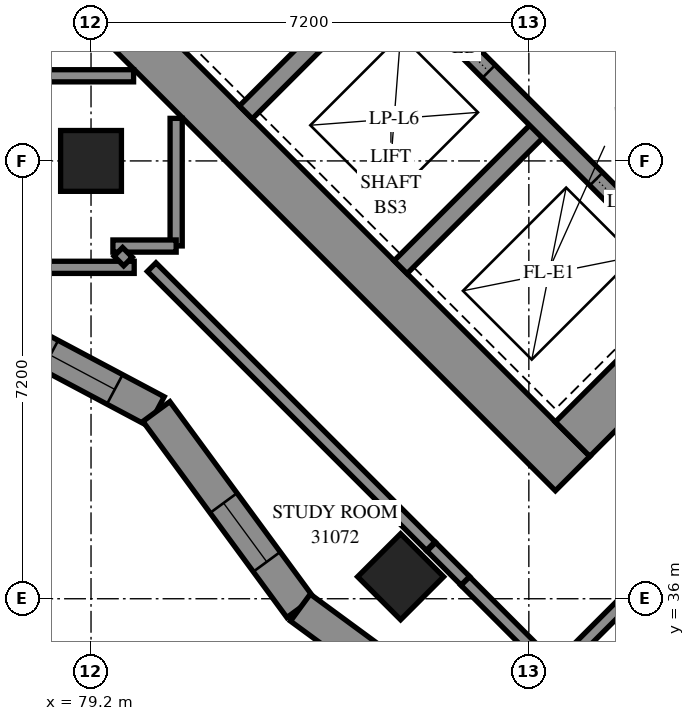
"""IFC4 building model, lengths in metres.
Left out: names, types, materials, properties, quantities, classifications, styles, units other than length and angle.
Written with IfcOpenShell. Run it as: python <this file> out.ifc"""

import sys

from ifc_helpers import new_model, si_unit, direction, frame, frame_2d, origin, origin_2d, place, context, subcontext, project, spatial, polyline, rectangle, outline, extrude, element, fill, save


model = new_model("IFC4")
c1 = context("Model", 3, precision=1e-05, world=origin(), true_north=direction((0.0, 1.0)))
c2 = subcontext(c1, "Body", "Model", "MODEL_VIEW")
j1 = project(units=[si_unit("LENGTHUNIT", "METRE"), si_unit("PLANEANGLEUNIT", "RADIAN")], contexts=[c1])
p1 = place(None, origin())
s1 = spatial("IfcSite", under=j1, at=p1, CompositionType="ELEMENT")
p2 = place(p1, origin())
s2 = spatial("IfcBuilding", under=s1, at=p2, CompositionType="ELEMENT")
p3 = place(p2, frame((0.0, 0.0, 115.2)))
s3 = spatial("IfcBuildingStorey", under=s2, at=p3, CompositionType="ELEMENT", Elevation=115.2)
for number, where, z_axis, x_axis in (
    (1, (79.2, 43.2, 0.0), (0.0, 0.0, 1.0), (1.0, 0.0, 0.0)),
    (2, (84.291, 36.362, 0.0), (0.0, 0.0, 1.0), (0.707, -0.707, 0.0)),
):
    element("IfcColumn", number, at=place(p3, frame(where, z_axis=z_axis, x_axis=x_axis)), inside=s3, PredefinedType="COLUMN", context=c2, shape_type="SweptSolid", body=[
        extrude(rectangle(XDim=1.0, YDim=1.0, at=origin_2d()), origin(), (0.0, 0.0, 1.0), 3.1),
    ])
p4 = place(p3, frame((75.806, 49.373, -0.3), z_axis=(0.0, 0.0, 1.0), x_axis=(0.7071067812, -0.7071067812, 0.0)))
e3 = element("IfcWall", 3, at=p4, inside=s3, PredefinedType="SHEAR", context=c2, shape_type="SweptSolid", body=[
    extrude(rectangle(XDim=16.0, YDim=0.8, at=frame_2d((8.0, 0.0))), origin(), (0.0, 0.0, 1.0), 2.7),
])
p5 = place(p3, frame((87.12, 38.625, -0.3), z_axis=(0.0, 0.0, 1.0), x_axis=(0.7071067812, 0.7071067812, 0.0)))
e4 = element("IfcWall", 4, at=p5, inside=s3, PredefinedType="SHEAR", context=c2, shape_type="SweptSolid", body=[
    extrude(rectangle(XDim=14.4, YDim=0.8, at=frame_2d((7.2, 0.0))), origin(), (0.0, 0.0, 1.0), 2.7),
])
p6 = place(p5, frame((4.55, 0.0, 0.3)))
e5 = element("IfcOpeningElement", 5, at=p6, cuts=e4, PredefinedType="OPENING", context=c2, shape_type="SweptSolid", body=[
    extrude(rectangle(XDim=1.1, YDim=2.1, at=frame_2d((0.55, 1.05))), frame((0.0, 0.41, 0.0), z_axis=(0.0, -1.0, 0.0), x_axis=(1.0, 0.0, 0.0)), (0.0, 0.0, 1.0), 0.82),
])
p7 = place(p5, frame((11.35, 0.0, 0.3)))
e6 = element("IfcOpeningElement", 6, at=p7, cuts=e4, PredefinedType="OPENING", context=c2, shape_type="SweptSolid", body=[
    extrude(rectangle(XDim=1.1, YDim=2.1, at=frame_2d((0.55, 1.05))), frame((0.0, 0.41, 0.0), z_axis=(0.0, -1.0, 0.0), x_axis=(1.0, 0.0, 0.0)), (0.0, 0.0, 1.0), 0.82),
])
for number, where, z_axis, x_axis in (
    (7, (81.746, 43.999, 0.0), (0.0, 0.0, 1.0), (0.707, 0.707, 0.0)),
    (8, (84.291, 41.453, 0.0), (0.0, 0.0, 1.0), (0.707, 0.707, 0.0)),
):
    element("IfcWall", number, at=place(p3, frame(where, z_axis=z_axis, x_axis=x_axis)), inside=s3, PredefinedType="SOLIDWALL", context=c2, shape_type="SweptSolid", body=[
        extrude(rectangle(XDim=3.3, YDim=0.3, at=frame_2d((1.65, 0.0))), origin(), (0.0, 0.0, 1.0), 3.1),
    ])
p8 = place(p3, frame((78.988, 51.423, 0.0), z_axis=(0.0, 0.0, 1.0), x_axis=(0.7071067812, -0.7071067812, 0.0)))
e9 = element("IfcWall", 9, at=p8, inside=s3, PredefinedType="SOLIDWALL", context=c2, shape_type="SweptSolid", body=[
    extrude(rectangle(XDim=14.4, YDim=0.3, at=frame_2d((7.2, 0.0))), origin(), (0.0, 0.0, 1.0), 3.1),
])
p9 = place(p8, frame((1.25, 0.0, 0.0)))
e10 = element("IfcOpeningElement", 10, at=p9, cuts=e9, PredefinedType="OPENING", context=c2, shape_type="SweptSolid", body=[
    extrude(rectangle(XDim=1.1, YDim=2.1, at=frame_2d((0.55, 1.05))), frame((0.0, 0.16, 0.0), z_axis=(0.0, -1.0, 0.0), x_axis=(1.0, 0.0, 0.0)), (0.0, 0.0, 1.0), 0.32),
])
p10 = place(p8, frame((4.85, 0.0, 0.0)))
e11 = element("IfcOpeningElement", 11, at=p10, cuts=e9, PredefinedType="OPENING", context=c2, shape_type="SweptSolid", body=[
    extrude(rectangle(XDim=1.1, YDim=2.1, at=frame_2d((0.55, 1.05))), frame((0.0, 0.16, 0.0), z_axis=(0.0, -1.0, 0.0), x_axis=(1.0, 0.0, 0.0)), (0.0, 0.0, 1.0), 0.32),
])
p11 = place(p8, frame((8.45, 0.0, 0.0)))
e12 = element("IfcOpeningElement", 12, at=p11, cuts=e9, PredefinedType="OPENING", context=c2, shape_type="SweptSolid", body=[
    extrude(rectangle(XDim=1.1, YDim=2.1, at=frame_2d((0.55, 1.05))), frame((0.0, 0.16, 0.0), z_axis=(0.0, -1.0, 0.0), x_axis=(1.0, 0.0, 0.0)), (0.0, 0.0, 1.0), 0.32),
])
p12 = place(p8, frame((12.05, 0.0, 0.0)))
e13 = element("IfcOpeningElement", 13, at=p12, cuts=e9, PredefinedType="OPENING", context=c2, shape_type="SweptSolid", body=[
    extrude(rectangle(XDim=1.1, YDim=2.1, at=frame_2d((0.55, 1.05))), frame((0.0, 0.16, 0.0), z_axis=(0.0, -1.0, 0.0), x_axis=(1.0, 0.0, 0.0)), (0.0, 0.0, 1.0), 0.32),
])
p13 = place(p3, frame((81.534, 53.969, 0.0), z_axis=(0.0, 0.0, 1.0), x_axis=(0.707103309, -0.7071102534, 0.0)))
e14 = element("IfcWall", 14, at=p13, inside=s3, PredefinedType="SOLIDWALL", context=c2, shape_type="SweptSolid", body=[
    extrude(rectangle(XDim=14.4, YDim=0.3, at=frame_2d((7.2, 0.0))), origin(), (0.0, 0.0, 1.0), 3.1),
])
p14 = place(p13, frame((12.05, 0.0, 0.0)))
e15 = element("IfcOpeningElement", 15, at=p14, cuts=e14, PredefinedType="OPENING", context=c2, shape_type="SweptSolid", body=[
    extrude(rectangle(XDim=1.1, YDim=2.1, at=frame_2d((0.55, 1.05))), frame((0.0, 0.16, 0.0), z_axis=(0.0, -1.0, 0.0), x_axis=(1.0, 0.0, 0.0)), (0.0, 0.0, 1.0), 0.32),
])
p15 = place(p3, frame((76.569, 41.05, 0.0), z_axis=(0.0, 0.0, 1.0), x_axis=(0.882964841, -0.4694391223, 0.0)))
e16 = element("IfcWall", 16, at=p15, inside=s3, PredefinedType="SOLIDWALL", context=c2, shape_type="SweptSolid", body=[
    extrude(outline(polyline([(0.021, -0.275), (4.135, -0.275), (4.26, 0.275), (-0.021, 0.275), (0.021, -0.275)])), origin(), (0.0, 0.0, 1.0), 3.1),
])
p16 = place(p15, frame((0.724, 0.0, 0.5)))
e17 = element("IfcOpeningElement", 17, at=p16, cuts=e16, PredefinedType="OPENING", context=c2, shape_type="SweptSolid", body=[
    extrude(rectangle(XDim=1.2, YDim=2.45, at=frame_2d((0.6, 1.225))), frame((0.0, 0.285, 0.0), z_axis=(0.0, -1.0, 0.0), x_axis=(1.0, 0.0, 0.0)), (0.0, 0.0, 1.0), 0.57),
])
p17 = place(p15, frame((2.223, 0.0, 0.5)))
e18 = element("IfcOpeningElement", 18, at=p17, cuts=e16, PredefinedType="OPENING", context=c2, shape_type="SweptSolid", body=[
    extrude(rectangle(XDim=1.2, YDim=2.45, at=frame_2d((0.6, 1.225))), frame((0.0, 0.285, 0.0), z_axis=(0.0, -1.0, 0.0), x_axis=(1.0, 0.0, 0.0)), (0.0, 0.0, 1.0), 0.57),
])
p18 = place(p3, frame((80.275, 39.079, 0.0), z_axis=(0.0, 0.0, 1.0), x_axis=(0.5918229872, -0.8060679573, 0.0)))
e19 = element("IfcWall", 19, at=p18, inside=s3, PredefinedType="SOLIDWALL", context=c2, shape_type="SweptSolid", body=[
    extrude(outline(polyline([(0.063, -0.275), (4.043, -0.275), (3.959, 0.275), (-0.063, 0.275), (0.063, -0.275)])), origin(), (0.0, 0.0, 1.0), 3.1),
])
p19 = place(p18, frame((1.867, 0.0, 0.5)))
e20 = element("IfcOpeningElement", 20, at=p19, cuts=e19, PredefinedType="OPENING", context=c2, shape_type="SweptSolid", body=[
    extrude(rectangle(XDim=1.2, YDim=2.45, at=frame_2d((0.6, 1.225))), frame((0.0, 0.285, 0.0), z_axis=(0.0, -1.0, 0.0), x_axis=(1.0, 0.0, 0.0)), (0.0, 0.0, 1.0), 0.57),
])
p20 = place(p3, frame((82.643, 35.854, 0.0), z_axis=(0.0, 0.0, 1.0), x_axis=(0.8060606099, -0.5918329943, 0.0)))
e21 = element("IfcWall", 21, at=p20, inside=s3, PredefinedType="SOLIDWALL", context=c2, shape_type="SweptSolid", body=[
    extrude(outline(polyline([(-0.042, -0.275), (3.938, -0.275), (4.022, 0.275), (0.042, 0.275), (-0.042, -0.275)])), origin(), (0.0, 0.0, 1.0), 3.1),
])
p21 = place(p20, frame((1.698, 0.0, 0.5)))
e22 = element("IfcOpeningElement", 22, at=p21, cuts=e21, PredefinedType="OPENING", context=c2, shape_type="SweptSolid", body=[
    extrude(rectangle(XDim=1.2, YDim=2.45, at=frame_2d((0.6, 1.225))), frame((0.0, 0.285, 0.0), z_axis=(0.0, -1.0, 0.0), x_axis=(1.0, 0.0, 0.0)), (0.0, 0.0, 1.0), 0.57),
])
p22 = place(p3, frame((86.33, 33.311, 0.0), z_axis=(0.0, 0.0, 1.0), x_axis=(0.7071067812, 0.7071067812, 0.0)))
e23 = element("IfcWall", 23, at=p22, inside=s3, PredefinedType="PARTITIONING", context=c2, shape_type="SweptSolid", body=[
    extrude(rectangle(XDim=11.616, YDim=0.2, at=frame_2d((5.808, 0.0))), origin(), (0.0, 0.0, 1.0), 3.1),
])
p23 = place(p3, frame((86.835, 34.806, 0.0), z_axis=(0.0, 0.0, 1.0), x_axis=(0.7071067812, 0.7071067812, 0.0)))
e24 = element("IfcWall", 24, at=p23, inside=s3, PredefinedType="PARTITIONING", context=c2, shape_type="SweptSolid", body=[
    extrude(rectangle(XDim=10.201, YDim=0.2, at=frame_2d((5.1, 0.0))), origin(), (0.0, 0.0, 1.0), 3.1),
])
p24 = place(p23, frame((8.959, 0.0, 0.0)))
e25 = element("IfcOpeningElement", 25, at=p24, cuts=e24, PredefinedType="OPENING", context=c2, shape_type="SweptSolid", body=[
    extrude(rectangle(XDim=1.0, YDim=2.1, at=frame_2d((0.5, 1.05))), frame((0.0, 0.11, 0.0), z_axis=(0.0, -1.0, 0.0), x_axis=(1.0, 0.0, 0.0)), (0.0, 0.0, 1.0), 0.22),
])
p25 = place(p3, frame((80.197, 41.453, 0.0), z_axis=(0.0, 0.0, 1.0), x_axis=(0.7071067812, -0.7071067812, 0.0)))
e26 = element("IfcWall", 26, at=p25, inside=s3, PredefinedType="PARTITIONING", context=c2, shape_type="SweptSolid", body=[
    extrude(rectangle(XDim=6.488, YDim=0.2, at=frame_2d((3.244, 0.0))), origin(), (0.0, 0.0, 1.0), 3.1),
])
p26 = place(p3, frame((77.452, 41.45, 0.0), z_axis=(0.0, 0.0, 1.0), x_axis=(1.0, 0.0, 0.0)))
e27 = element("IfcWall", 27, at=p26, inside=s3, PredefinedType="PARTITIONING", context=c2, shape_type="SweptSolid", body=[
    extrude(rectangle(XDim=2.458, YDim=0.2, at=frame_2d((1.229, 0.0))), origin(), (0.0, 0.0, 1.0), 3.1),
])
p27 = place(p3, frame((85.353, 36.293, 0.0), z_axis=(0.0, 0.0, 1.0), x_axis=(0.7066304548, -0.7075827869, 0.0)))
e28 = element("IfcWall", 28, at=p27, inside=s3, PredefinedType="PARTITIONING", context=c2, shape_type="SweptSolid", body=[
    extrude(rectangle(XDim=2.1, YDim=0.2, at=frame_2d((1.05, 0.0))), origin(), (0.0, 0.0, 1.0), 3.1),
])
for number, where, z_axis, x_axis in (
    (29, (77.802, 44.6, 0.0), (0.0, 0.0, 1.0), (1.0, 0.0, 0.0)),
    (30, (80.6, 41.802, 0.0), (0.0, 0.0, 1.0), (0.0, 1.0, 0.0)),
):
    element("IfcWall", number, at=place(p3, frame(where, z_axis=z_axis, x_axis=x_axis)), inside=s3, PredefinedType="PARTITIONING", context=c2, shape_type="SweptSolid", body=[
        extrude(rectangle(XDim=2.098, YDim=0.2, at=frame_2d((1.049, 0.0))), origin(), (0.0, 0.0, 1.0), 3.1),
    ])
p28 = place(p3, frame((79.56, 41.8, 0.0), z_axis=(0.0, 0.0, 1.0), x_axis=(1.0, 0.0, 0.0)))
e31 = element("IfcWall", 31, at=p28, inside=s3, PredefinedType="PARTITIONING", context=c2, shape_type="SweptSolid", body=[
    extrude(rectangle(XDim=1.04, YDim=0.2, at=frame_2d((0.52, 0.0))), origin(), (0.0, 0.0, 1.0), 3.1),
])
p29 = place(p3, frame((84.795, 36.855, 0.0), z_axis=(0.0, 0.0, 1.0), x_axis=(0.7071067812, -0.7071067812, 0.0)))
e32 = element("IfcWall", 32, at=p29, inside=s3, PredefinedType="PARTITIONING", context=c2, shape_type="SweptSolid", body=[
    extrude(rectangle(XDim=0.792, YDim=0.2, at=frame_2d((0.396, 0.0))), origin(), (0.0, 0.0, 1.0), 3.1),
])
p30 = place(p3, frame((79.649, 41.705, 0.0), z_axis=(0.0, 0.0, 1.0), x_axis=(0.7068844555, -0.707329037, 0.0)))
e33 = element("IfcWall", 33, at=p30, inside=s3, PredefinedType="PARTITIONING", context=c2, shape_type="SweptSolid", body=[
    extrude(rectangle(XDim=0.225, YDim=0.2, at=frame_2d((0.112, 0.0))), origin(), (0.0, 0.0, 1.0), 3.1),
])
p31 = place(p17, origin())
e34 = element("IfcWindow", 34, at=p31, inside=s3, PartitioningType="SINGLE_PANEL", PredefinedType="WINDOW", context=c2, shape_type="SweptSolid", body=[
    extrude(rectangle(XDim=1.2, YDim=2.45, at=frame_2d((0.6, 1.225))), frame((0.0, 0.155, 0.0), z_axis=(0.0, -1.0, 0.0), x_axis=(1.0, 0.0, 0.0)), (0.0, 0.0, 1.0), 0.06),
])
fill(e18, e34)
p32 = place(p19, origin())
e35 = element("IfcWindow", 35, at=p32, inside=s3, PartitioningType="SINGLE_PANEL", PredefinedType="WINDOW", context=c2, shape_type="SweptSolid", body=[
    extrude(rectangle(XDim=1.2, YDim=2.45, at=frame_2d((0.6, 1.225))), frame((0.0, 0.155, 0.0), z_axis=(0.0, -1.0, 0.0), x_axis=(1.0, 0.0, 0.0)), (0.0, 0.0, 1.0), 0.06),
])
fill(e20, e35)
p33 = place(p11, origin())
e36 = element("IfcDoor", 36, at=p33, inside=s3, OperationType="SLIDING_TO_LEFT", PredefinedType="DOOR", context=c2, shape_type="SweptSolid", body=[
    extrude(rectangle(XDim=1.1, YDim=2.1, at=frame_2d((0.55, 1.05))), frame((0.0, 0.025, 0.0), z_axis=(0.0, -1.0, 0.0), x_axis=(1.0, 0.0, 0.0)), (0.0, 0.0, 1.0), 0.05),
])
fill(e12, e36)
p34 = place(p12, origin())
e37 = element("IfcDoor", 37, at=p34, inside=s3, OperationType="SLIDING_TO_RIGHT", PredefinedType="DOOR", context=c2, shape_type="SweptSolid", body=[
    extrude(rectangle(XDim=1.1, YDim=2.1, at=frame_2d((0.55, 1.05))), frame((0.0, 0.025, 0.0), z_axis=(0.0, -1.0, 0.0), x_axis=(1.0, 0.0, 0.0)), (0.0, 0.0, 1.0), 0.05),
])
fill(e13, e37)
save(model, sys.argv[1])
